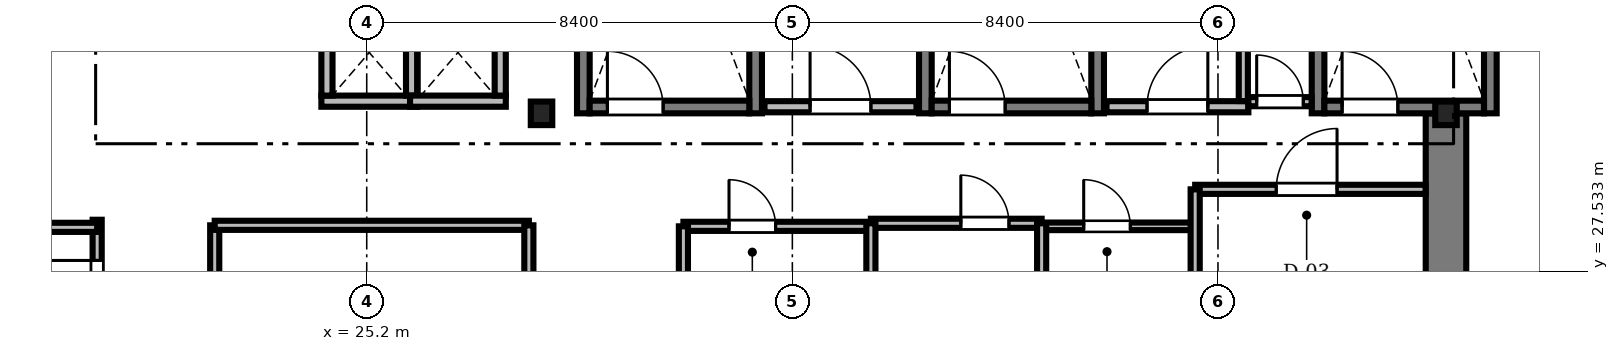
"""IFC4 building model, lengths in metres.
Left out: names, types, materials, properties, quantities, classifications, styles, units other than length and angle.
Written with IfcOpenShell. Run it as: python <this file> out.ifc"""

import sys

from ifc_helpers import new_model, si_unit, direction, frame, frame_2d, origin, origin_2d, place, context, subcontext, project, spatial, rectangle, i_section, extrude, source, transform, mapped, element, fill, save


model = new_model("IFC4")
c1 = context("Model", 3, precision=1e-05, world=origin(), true_north=direction((0.0, 1.0)))
c2 = subcontext(c1, "Body", "Model", "MODEL_VIEW")
j1 = project(units=[si_unit("LENGTHUNIT", "METRE"), si_unit("PLANEANGLEUNIT", "RADIAN")], contexts=[c1])
p1 = place(None, origin())
s1 = spatial("IfcSite", under=j1, at=p1, CompositionType="ELEMENT")
p2 = place(p1, origin())
s2 = spatial("IfcBuilding", under=s1, at=p2, CompositionType="ELEMENT")
p3 = place(p2, frame((0.0, 0.0, 148.3)))
s3 = spatial("IfcBuildingStorey", under=s2, at=p3, CompositionType="ELEMENT", Elevation=148.3)
m1 = source(origin(), c2, "Body", "SweptSolid", [
    extrude(rectangle(XDim=13.15, YDim=0.8, at=frame_2d((6.575, 0.0))), origin(), (0.0, 0.0, 1.0), 3.46),
])
p4 = place(p3, frame((46.5, 17.5, 0.0), z_axis=(0.0, 0.0, 1.0), x_axis=(0.0, 1.0, 0.0)))
e1 = element("IfcWall", 1, at=p4, inside=s3, PredefinedType="SHEAR", context=c2, shape_type="MappedRepresentation", body=[
    mapped(m1, transform((0.0, 0.0, 0.0), scale=1.0)),
])
m2 = source(origin(), c2, "Body", "SweptSolid", [
    extrude(i_section(OverallWidth=0.424, OverallDepth=0.465, WebThickness=0.035, FlangeThickness=0.056, FilletRadius=0.015, at=origin_2d()), origin(), (0.0, 0.0, 1.0), 3.46),
])
for number, where, z_axis, x_axis in (
    (2, (28.65, 30.65, 0.0), (0.0, 0.0, 1.0), (1.0, 0.0, 0.0)),
    (3, (46.5, 30.65, 0.0), (0.0, 0.0, 1.0), (1.0, 0.0, 0.0)),
):
    element("IfcColumn", number, at=place(p3, frame(where, z_axis=z_axis, x_axis=x_axis)), inside=s3, PredefinedType="COLUMN", context=c2, shape_type="MappedRepresentation", body=[
        mapped(m2, transform((0.0, 0.0, 0.0), scale=1.0)),
    ])
m3 = source(origin(), c2, "Body", "SweptSolid", [
    extrude(rectangle(XDim=9.25, YDim=0.25, at=frame_2d((4.625, 0.0))), origin(), (0.0, 0.0, 1.0), 3.5),
])
for number, where, z_axis, x_axis in (
    (4, (29.475, 30.65, 0.0), (0.0, 0.0, 1.0), (0.0, 1.0, 0.0)),
    (5, (32.875, 30.65, 0.0), (0.0, 0.0, 1.0), (0.0, 1.0, 0.0)),
):
    element("IfcWall", number, at=place(p3, frame(where, z_axis=z_axis, x_axis=x_axis)), inside=s3, PredefinedType="SOLIDWALL", context=c2, shape_type="MappedRepresentation", body=[
        mapped(m3, transform((0.0, 0.0, 0.0), scale=1.0)),
    ])
m4 = source(origin(), c2, "Body", "SweptSolid", [
    extrude(rectangle(XDim=3.15, YDim=0.25, at=frame_2d((1.575, 0.0))), origin(), (0.0, 0.0, 1.0), 3.5),
])
p5 = place(p3, frame((29.6, 30.775, 0.0), z_axis=(0.0, 0.0, 1.0), x_axis=(1.0, 0.0, 0.0)))
e6 = element("IfcWall", 6, at=p5, inside=s3, PredefinedType="SOLIDWALL", context=c2, shape_type="MappedRepresentation", body=[
    mapped(m4, transform((0.0, 0.0, 0.0), scale=1.0)),
])
m5 = source(origin(), c2, "Body", "SweptSolid", [
    extrude(rectangle(XDim=1.1, YDim=2.2, at=frame_2d((0.55, 1.1))), frame((0.0, 0.135, 0.0), z_axis=(0.0, -1.0, 0.0), x_axis=(1.0, 0.0, 0.0)), (0.0, 0.0, 1.0), 0.27),
])
p6 = place(p5, frame((0.35, 0.0, 0.0)))
e7 = element("IfcOpeningElement", 7, at=p6, cuts=e6, PredefinedType="OPENING", context=c2, shape_type="MappedRepresentation", body=[
    mapped(m5, transform((0.0, 0.0, 0.0), scale=1.0)),
])
for number, where, z_axis, x_axis in (
    (8, (36.225, 30.65, 0.0), (0.0, 0.0, 1.0), (0.0, 1.0, 0.0)),
    (9, (39.625, 30.65, 0.0), (0.0, 0.0, 1.0), (0.0, 1.0, 0.0)),
):
    element("IfcWall", number, at=place(p3, frame(where, z_axis=z_axis, x_axis=x_axis)), inside=s3, PredefinedType="SOLIDWALL", context=c2, shape_type="MappedRepresentation", body=[
        mapped(m3, transform((0.0, 0.0, 0.0), scale=1.0)),
    ])
p7 = place(p3, frame((36.35, 30.775, 0.0), z_axis=(0.0, 0.0, 1.0), x_axis=(1.0, 0.0, 0.0)))
e10 = element("IfcWall", 10, at=p7, inside=s3, PredefinedType="SOLIDWALL", context=c2, shape_type="MappedRepresentation", body=[
    mapped(m4, transform((0.0, 0.0, 0.0), scale=1.0)),
])
p8 = place(p7, frame((0.35, 0.0, 0.0)))
e11 = element("IfcOpeningElement", 11, at=p8, cuts=e10, PredefinedType="OPENING", context=c2, shape_type="MappedRepresentation", body=[
    mapped(m5, transform((0.0, 0.0, 0.0), scale=1.0)),
])
for number, where, z_axis, x_axis in (
    (12, (43.975, 30.65, 0.0), (0.0, 0.0, 1.0), (0.0, 1.0, 0.0)),
    (13, (47.375, 30.65, 0.0), (0.0, 0.0, 1.0), (0.0, 1.0, 0.0)),
):
    element("IfcWall", number, at=place(p3, frame(where, z_axis=z_axis, x_axis=x_axis)), inside=s3, PredefinedType="SOLIDWALL", context=c2, shape_type="MappedRepresentation", body=[
        mapped(m3, transform((0.0, 0.0, 0.0), scale=1.0)),
    ])
p9 = place(p3, frame((44.1, 30.775, 0.0), z_axis=(0.0, 0.0, 1.0), x_axis=(1.0, 0.0, 0.0)))
e14 = element("IfcWall", 14, at=p9, inside=s3, PredefinedType="SOLIDWALL", context=c2, shape_type="MappedRepresentation", body=[
    mapped(m4, transform((0.0, 0.0, 0.0), scale=1.0)),
])
p10 = place(p9, frame((0.35, 0.0, 0.0)))
e15 = element("IfcOpeningElement", 15, at=p10, cuts=e14, PredefinedType="OPENING", context=c2, shape_type="MappedRepresentation", body=[
    mapped(m5, transform((0.0, 0.0, 0.0), scale=1.0)),
])
m6 = source(origin(), c2, "Body", "SweptSolid", [
    extrude(rectangle(XDim=3.0, YDim=0.22, at=frame_2d((1.5, 0.0))), origin(), (0.0, 0.0, 1.0), 3.46),
])
p11 = place(p3, frame((33.05, 30.78, 0.0), z_axis=(0.0, 0.0, 1.0), x_axis=(1.0, 0.0, 0.0)))
e16 = element("IfcWall", 16, at=p11, inside=s3, PredefinedType="SOLIDWALL", context=c2, shape_type="MappedRepresentation", body=[
    mapped(m6, transform((0.0, 0.0, 0.0), scale=1.0)),
])
m7 = source(origin(), c2, "Body", "SweptSolid", [
    extrude(rectangle(XDim=1.2, YDim=2.2, at=frame_2d((0.6, 1.1))), frame((0.0, 0.12, 0.0), z_axis=(0.0, -1.0, 0.0), x_axis=(1.0, 0.0, 0.0)), (0.0, 0.0, 1.0), 0.24),
])
p12 = place(p11, frame((0.9, 0.0, 0.0)))
e17 = element("IfcOpeningElement", 17, at=p12, cuts=e16, PredefinedType="OPENING", context=c2, shape_type="MappedRepresentation", body=[
    mapped(m7, transform((0.0, 0.0, 0.0), scale=1.0)),
])
m8 = source(origin(), c2, "Body", "SweptSolid", [
    extrude(rectangle(XDim=2.8, YDim=0.22, at=frame_2d((1.4, 0.0))), origin(), (0.0, 0.0, 1.0), 3.46),
])
p13 = place(p3, frame((39.8, 30.78, 0.0), z_axis=(0.0, 0.0, 1.0), x_axis=(1.0, 0.0, 0.0)))
e18 = element("IfcWall", 18, at=p13, inside=s3, PredefinedType="SOLIDWALL", context=c2, shape_type="MappedRepresentation", body=[
    mapped(m8, transform((0.0, 0.0, 0.0), scale=1.0)),
])
p14 = place(p13, frame((0.8, 0.0, 0.0)))
e19 = element("IfcOpeningElement", 19, at=p14, cuts=e18, PredefinedType="OPENING", context=c2, shape_type="MappedRepresentation", body=[
    mapped(m7, transform((0.0, 0.0, 0.0), scale=1.0)),
])
m9 = source(origin(), c2, "Body", "SweptSolid", [
    extrude(rectangle(XDim=1.89, YDim=0.22, at=frame_2d((0.945, 0.0))), origin(), (0.0, 0.0, 1.0), 3.46),
])
p15 = place(p3, frame((24.305, 30.89, 0.0), z_axis=(0.0, 0.0, 1.0), x_axis=(1.0, 0.0, 0.0)))
e20 = element("IfcWall", 20, at=p15, inside=s3, PredefinedType="SOLIDWALL", context=c2, shape_type="MappedRepresentation", body=[
    mapped(m9, transform((0.0, 0.0, 0.0), scale=1.0)),
])
m10 = source(origin(), c2, "Body", "SweptSolid", [
    extrude(rectangle(XDim=1.7, YDim=0.22, at=frame_2d((0.85, 0.0))), origin(), (0.0, 0.0, 1.0), 3.46),
])
for number, where, z_axis, x_axis in (
    (21, (24.415, 31.0, 0.0), (0.0, 0.0, 1.0), (0.0, 1.0, 0.0)),
    (22, (26.085, 31.0, 0.0), (0.0, 0.0, 1.0), (0.0, 1.0, 0.0)),
):
    element("IfcWall", number, at=place(p3, frame(where, z_axis=z_axis, x_axis=x_axis)), inside=s3, PredefinedType="SOLIDWALL", context=c2, shape_type="MappedRepresentation", body=[
        mapped(m10, transform((0.0, 0.0, 0.0), scale=1.0)),
    ])
p16 = place(p3, frame((26.055, 30.89, 0.0), z_axis=(0.0, 0.0, 1.0), x_axis=(1.0, 0.0, 0.0)))
e23 = element("IfcWall", 23, at=p16, inside=s3, PredefinedType="SOLIDWALL", context=c2, shape_type="MappedRepresentation", body=[
    mapped(m9, transform((0.0, 0.0, 0.0), scale=1.0)),
])
p17 = place(p3, frame((27.835, 31.0, 0.0), z_axis=(0.0, 0.0, 1.0), x_axis=(0.0, 1.0, 0.0)))
e24 = element("IfcWall", 24, at=p17, inside=s3, PredefinedType="SOLIDWALL", context=c2, shape_type="MappedRepresentation", body=[
    mapped(m10, transform((0.0, 0.0, 0.0), scale=1.0)),
])
m11 = source(origin(), c2, "Body", "SweptSolid", [
    extrude(rectangle(XDim=14.0, YDim=0.18, at=frame_2d((7.0, 0.0))), origin(), (0.0, 0.0, 1.0), 2.852),
])
p18 = place(p3, frame((19.88, 14.55, 0.0), z_axis=(0.0, 0.0, 1.0), x_axis=(0.0, 1.0, 0.0)))
e25 = element("IfcWall", 25, at=p18, inside=s3, PredefinedType="PARTITIONING", context=c2, shape_type="MappedRepresentation", body=[
    mapped(m11, transform((0.0, 0.0, 0.0), scale=1.0)),
])
m12 = source(origin(), c2, "Body", "SweptSolid", [
    extrude(rectangle(XDim=1.05, YDim=2.2, at=frame_2d((0.525, 1.1))), frame((0.0, 0.1, 0.0), z_axis=(0.0, -1.0, 0.0), x_axis=(1.0, 0.0, 0.0)), (0.0, 0.0, 1.0), 0.2),
])
p19 = place(p18, frame((1.788, 0.0, 0.0)))
e26 = element("IfcOpeningElement", 26, at=p19, cuts=e25, PredefinedType="OPENING", context=c2, shape_type="MappedRepresentation", body=[
    mapped(m12, transform((0.0, 0.0, 0.0), scale=1.0)),
])
m13 = source(origin(), c2, "Body", "SweptSolid", [
    extrude(rectangle(XDim=0.95, YDim=2.15, at=frame_2d((0.475, 1.075))), frame((0.0, 0.1, 0.0), z_axis=(0.0, -1.0, 0.0), x_axis=(1.0, 0.0, 0.0)), (0.0, 0.0, 1.0), 0.2),
])
p20 = place(p18, frame((7.63, 0.0, 0.0)))
e27 = element("IfcOpeningElement", 27, at=p20, cuts=e25, PredefinedType="OPENING", context=c2, shape_type="MappedRepresentation", body=[
    mapped(m13, transform((0.0, 0.0, 0.0), scale=1.0)),
])
p21 = place(p18, frame((12.247, 0.0, 0.0)))
e28 = element("IfcOpeningElement", 28, at=p21, cuts=e25, PredefinedType="OPENING", context=c2, shape_type="MappedRepresentation", body=[
    mapped(m13, transform((0.0, 0.0, 0.0), scale=1.0)),
])
m14 = source(origin(), c2, "Body", "SweptSolid", [
    extrude(rectangle(XDim=4.548, YDim=0.18, at=frame_2d((2.274, 0.0))), origin(), (0.0, 0.0, 1.0), 3.092),
])
p22 = place(p3, frame((41.55, 29.15, 0.0), z_axis=(0.0, 0.0, 1.0), x_axis=(1.0, 0.0, 0.0)))
e29 = element("IfcWall", 29, at=p22, inside=s3, PredefinedType="PARTITIONING", context=c2, shape_type="MappedRepresentation", body=[
    mapped(m14, transform((0.0, 0.0, 0.0), scale=1.0)),
])
m15 = source(origin(), c2, "Body", "SweptSolid", [
    extrude(rectangle(XDim=1.2, YDim=2.2, at=frame_2d((0.6, 1.1))), frame((0.0, 0.1, 0.0), z_axis=(0.0, -1.0, 0.0), x_axis=(1.0, 0.0, 0.0)), (0.0, 0.0, 1.0), 0.2),
])
p23 = place(p22, frame((1.6, 0.0, 0.0)))
e30 = element("IfcOpeningElement", 30, at=p23, cuts=e29, PredefinedType="OPENING", context=c2, shape_type="MappedRepresentation", body=[
    mapped(m15, transform((0.0, 0.0, 0.0), scale=1.0)),
])
m16 = source(origin(), c2, "Body", "SweptSolid", [
    extrude(rectangle(XDim=4.24, YDim=0.18, at=frame_2d((2.12, 0.0))), origin(), (0.0, 0.0, 1.0), 2.852),
])
p24 = place(p3, frame((22.2, 24.2, 0.0), z_axis=(0.0, 0.0, 1.0), x_axis=(0.0, 1.0, 0.0)))
e31 = element("IfcWall", 31, at=p24, inside=s3, PredefinedType="PARTITIONING", context=c2, shape_type="MappedRepresentation", body=[
    mapped(m16, transform((0.0, 0.0, 0.0), scale=1.0)),
])
p25 = place(p24, frame((1.4, 0.0, 0.0)))
e32 = element("IfcOpeningElement", 32, at=p25, cuts=e31, PredefinedType="OPENING", context=c2, shape_type="MappedRepresentation", body=[
    mapped(m12, transform((0.0, 0.0, 0.0), scale=1.0)),
])
m17 = source(origin(), c2, "Body", "SweptSolid", [
    extrude(rectangle(XDim=3.7, YDim=0.18, at=frame_2d((1.85, 0.0))), origin(), (0.0, 0.0, 1.0), 3.092),
])
p26 = place(p3, frame((31.45, 28.42, 0.0), z_axis=(0.0, 0.0, 1.0), x_axis=(1.0, 0.0, 0.0)))
e33 = element("IfcWall", 33, at=p26, inside=s3, PredefinedType="PARTITIONING", context=c2, shape_type="MappedRepresentation", body=[
    mapped(m17, transform((0.0, 0.0, 0.0), scale=1.0)),
])
m18 = source(origin(), c2, "Body", "SweptSolid", [
    extrude(rectangle(XDim=0.92, YDim=2.1, at=frame_2d((0.46, 1.05))), frame((0.0, 0.1, 0.0), z_axis=(0.0, -1.0, 0.0), x_axis=(1.0, 0.0, 0.0)), (0.0, 0.0, 1.0), 0.2),
])
p27 = place(p26, frame((0.9, 0.0, 0.0)))
e34 = element("IfcOpeningElement", 34, at=p27, cuts=e33, PredefinedType="OPENING", context=c2, shape_type="MappedRepresentation", body=[
    mapped(m18, transform((0.0, 0.0, 0.0), scale=1.0)),
])
m19 = source(origin(), c2, "Body", "SweptSolid", [
    extrude(rectangle(XDim=3.37, YDim=0.18, at=frame_2d((1.685, 0.0))), origin(), (0.0, 0.0, 1.0), 3.46),
])
p28 = place(p3, frame((35.15, 28.48, 0.0), z_axis=(0.0, 0.0, 1.0), x_axis=(1.0, 0.0, 0.0)))
e35 = element("IfcWall", 35, at=p28, inside=s3, PredefinedType="PARTITIONING", context=c2, shape_type="MappedRepresentation", body=[
    mapped(m19, transform((0.0, 0.0, 0.0), scale=1.0)),
])
p29 = place(p28, frame((1.775, 0.0, 0.0)))
e36 = element("IfcOpeningElement", 36, at=p29, cuts=e35, PredefinedType="OPENING", context=c2, shape_type="MappedRepresentation", body=[
    mapped(m13, transform((0.0, 0.0, 0.0), scale=1.0)),
])
m20 = source(origin(), c2, "Body", "SweptSolid", [
    extrude(rectangle(XDim=3.0, YDim=0.15, at=frame_2d((1.5, 0.0))), origin(), (0.0, 0.0, 1.0), 3.46),
])
p30 = place(p3, frame((38.52, 28.42, 0.0), z_axis=(0.0, 0.0, 1.0), x_axis=(1.0, 0.0, 0.0)))
e37 = element("IfcWall", 37, at=p30, inside=s3, PredefinedType="PARTITIONING", context=c2, shape_type="MappedRepresentation", body=[
    mapped(m20, transform((0.0, 0.0, 0.0), scale=1.0)),
])
m21 = source(origin(), c2, "Body", "SweptSolid", [
    extrude(rectangle(XDim=0.92, YDim=2.1, at=frame_2d((0.46, 1.05))), frame((0.0, 0.085, 0.0), z_axis=(0.0, -1.0, 0.0), x_axis=(1.0, 0.0, 0.0)), (0.0, 0.0, 1.0), 0.17),
])
p31 = place(p30, frame((0.83, 0.0, 0.0)))
e38 = element("IfcOpeningElement", 38, at=p31, cuts=e37, PredefinedType="OPENING", context=c2, shape_type="MappedRepresentation", body=[
    mapped(m21, transform((0.0, 0.0, 0.0), scale=1.0)),
])
m22 = source(origin(), c2, "Body", "SweptSolid", [
    extrude(rectangle(XDim=1.248, YDim=0.18, at=frame_2d((0.624, 0.0))), origin(), (0.0, 0.0, 1.0), 3.46),
])
p32 = place(p3, frame((42.6, 30.88, 0.0), z_axis=(0.0, 0.0, 1.0), x_axis=(1.0, 0.0, 0.0)))
e39 = element("IfcWall", 39, at=p32, inside=s3, PredefinedType="PARTITIONING", context=c2, shape_type="MappedRepresentation", body=[
    mapped(m22, transform((0.0, 0.0, 0.0), scale=1.0)),
])
p33 = place(p32, frame((0.164, 0.0, 0.0)))
e40 = element("IfcOpeningElement", 40, at=p33, cuts=e39, PredefinedType="OPENING", context=c2, shape_type="MappedRepresentation", body=[
    mapped(m18, transform((0.0, 0.0, 0.0), scale=1.0)),
])
m23 = source(origin(), c2, "Body", "SweptSolid", [
    extrude(rectangle(XDim=13.15, YDim=0.18, at=frame_2d((6.575, 0.0))), origin(), (0.0, 0.0, 1.0), 2.702),
])
p34 = place(p3, frame((6.73, 28.4, 0.0), z_axis=(0.0, 0.0, 1.0), x_axis=(1.0, 0.0, 0.0)))
e41 = element("IfcWall", 41, at=p34, inside=s3, PredefinedType="PARTITIONING", context=c2, shape_type="MappedRepresentation", body=[
    mapped(m23, transform((0.0, 0.0, 0.0), scale=1.0)),
])
m24 = source(origin(), c2, "Body", "SweptSolid", [
    extrude(rectangle(XDim=6.2, YDim=0.18, at=frame_2d((3.1, 0.0))), origin(), (0.0, 0.0, 1.0), 3.46),
])
p35 = place(p3, frame((22.2, 28.44, 0.0), z_axis=(0.0, 0.0, 1.0), x_axis=(1.0, 0.0, 0.0)))
e42 = element("IfcWall", 42, at=p35, inside=s3, PredefinedType="PARTITIONING", context=c2, shape_type="MappedRepresentation", body=[
    mapped(m24, transform((0.0, 0.0, 0.0), scale=1.0)),
])
p36 = place(p3, frame((28.4, 24.2, 0.0), z_axis=(0.0, 0.0, 1.0), x_axis=(0.0, 1.0, 0.0)))
e43 = element("IfcWall", 43, at=p36, inside=s3, PredefinedType="PARTITIONING", context=c2, shape_type="MappedRepresentation", body=[
    mapped(m16, transform((0.0, 0.0, 0.0), scale=1.0)),
])
m25 = source(origin(), c2, "Body", "SweptSolid", [
    extrude(rectangle(XDim=2.35, YDim=0.18, at=frame_2d((1.175, 0.0))), origin(), (0.0, 0.0, 1.0), 2.852),
])
p37 = place(p3, frame((41.55, 26.8, 0.0), z_axis=(0.0, 0.0, 1.0), x_axis=(0.0, 1.0, 0.0)))
e44 = element("IfcWall", 44, at=p37, inside=s3, PredefinedType="PARTITIONING", context=c2, shape_type="MappedRepresentation", body=[
    mapped(m25, transform((0.0, 0.0, 0.0), scale=1.0)),
])
m26 = source(origin(), c2, "Body", "SweptSolid", [
    extrude(rectangle(XDim=1.858, YDim=0.18, at=frame_2d((0.929, 0.0))), origin(), (0.0, 0.0, 1.0), 3.46),
])
p38 = place(p3, frame((42.5, 30.892, 0.0), z_axis=(0.0, 0.0, 1.0), x_axis=(0.0, 1.0, 0.0)))
e45 = element("IfcWall", 45, at=p38, inside=s3, PredefinedType="PARTITIONING", context=c2, shape_type="MappedRepresentation", body=[
    mapped(m26, transform((0.0, 0.0, 0.0), scale=1.0)),
])
m27 = source(origin(), c2, "Body", "SweptSolid", [
    extrude(rectangle(XDim=1.66, YDim=0.18, at=frame_2d((0.83, 0.0))), origin(), (0.0, 0.0, 1.0), 3.002),
])
for number, where, z_axis, x_axis in (
    (46, (35.15, 26.82, 0.0), (0.0, 0.0, 1.0), (0.0, 1.0, 0.0)),
    (47, (38.52, 26.82, 0.0), (0.0, 0.0, 1.0), (0.0, 1.0, 0.0)),
):
    element("IfcWall", number, at=place(p3, frame(where, z_axis=z_axis, x_axis=x_axis)), inside=s3, PredefinedType="PARTITIONING", context=c2, shape_type="MappedRepresentation", body=[
        mapped(m27, transform((0.0, 0.0, 0.0), scale=1.0)),
    ])
m28 = source(origin(), c2, "Body", "SweptSolid", [
    extrude(rectangle(XDim=1.6, YDim=0.18, at=frame_2d((0.8, 0.0))), origin(), (0.0, 0.0, 1.0), 3.002),
])
p39 = place(p3, frame((31.45, 26.82, 0.0), z_axis=(0.0, 0.0, 1.0), x_axis=(0.0, 1.0, 0.0)))
e48 = element("IfcWall", 48, at=p39, inside=s3, PredefinedType="PARTITIONING", context=c2, shape_type="MappedRepresentation", body=[
    mapped(m28, transform((0.0, 0.0, 0.0), scale=1.0)),
])
m29 = source(origin(), c2, "Body", "SweptSolid", [
    extrude(rectangle(XDim=1.1, YDim=2.2, at=frame_2d((0.55, 1.1))), frame((0.0, 0.025, 0.0), z_axis=(0.0, -1.0, 0.0), x_axis=(1.0, 0.0, 0.0)), (0.0, 0.0, 1.0), 0.05),
])
p40 = place(p6, origin())
e49 = element("IfcDoor", 49, at=p40, inside=s3, OperationType="SINGLE_SWING_LEFT", PredefinedType="DOOR", context=c2, shape_type="MappedRepresentation", body=[
    mapped(m29, transform((0.0, 0.0, 0.0), scale=1.0)),
])
fill(e7, e49)
p41 = place(p8, origin())
e50 = element("IfcDoor", 50, at=p41, inside=s3, OperationType="SINGLE_SWING_LEFT", PredefinedType="DOOR", context=c2, shape_type="MappedRepresentation", body=[
    mapped(m29, transform((0.0, 0.0, 0.0), scale=1.0)),
])
fill(e11, e50)
p42 = place(p10, origin())
e51 = element("IfcDoor", 51, at=p42, inside=s3, OperationType="SINGLE_SWING_LEFT", PredefinedType="DOOR", context=c2, shape_type="MappedRepresentation", body=[
    mapped(m29, transform((0.0, 0.0, 0.0), scale=1.0)),
])
fill(e15, e51)
m30 = source(origin(), c2, "Body", "SweptSolid", [
    extrude(rectangle(XDim=1.2, YDim=2.2, at=frame_2d((0.6, 1.1))), frame((0.0, 0.025, 0.0), z_axis=(0.0, -1.0, 0.0), x_axis=(1.0, 0.0, 0.0)), (0.0, 0.0, 1.0), 0.05),
])
p43 = place(p12, origin())
e52 = element("IfcDoor", 52, at=p43, inside=s3, OperationType="SINGLE_SWING_LEFT", PredefinedType="DOOR", context=c2, shape_type="MappedRepresentation", body=[
    mapped(m30, transform((0.0, 0.0, 0.0), scale=1.0)),
])
fill(e17, e52)
p44 = place(p14, origin())
e53 = element("IfcDoor", 53, at=p44, inside=s3, OperationType="SINGLE_SWING_RIGHT", PredefinedType="DOOR", context=c2, shape_type="MappedRepresentation", body=[
    mapped(m30, transform((0.0, 0.0, 0.0), scale=1.0)),
])
fill(e19, e53)
m31 = source(origin(), c2, "Body", "SweptSolid", [
    extrude(rectangle(XDim=0.95, YDim=2.15, at=frame_2d((0.475, 1.075))), frame((0.0, 0.025, 0.0), z_axis=(0.0, -1.0, 0.0), x_axis=(1.0, 0.0, 0.0)), (0.0, 0.0, 1.0), 0.05),
])
p45 = place(p21, origin())
e54 = element("IfcDoor", 54, at=p45, inside=s3, OperationType="SINGLE_SWING_RIGHT", PredefinedType="DOOR", context=c2, shape_type="MappedRepresentation", body=[
    mapped(m31, transform((0.0, 0.0, 0.0), scale=1.0)),
])
fill(e28, e54)
p46 = place(p23, origin())
e55 = element("IfcDoor", 55, at=p46, inside=s3, OperationType="SINGLE_SWING_RIGHT", PredefinedType="DOOR", context=c2, shape_type="MappedRepresentation", body=[
    mapped(m30, transform((0.0, 0.0, 0.0), scale=1.0)),
])
fill(e30, e55)
m32 = source(origin(), c2, "Body", "SweptSolid", [
    extrude(rectangle(XDim=0.92, YDim=2.1, at=frame_2d((0.46, 1.05))), frame((0.0, 0.025, 0.0), z_axis=(0.0, -1.0, 0.0), x_axis=(1.0, 0.0, 0.0)), (0.0, 0.0, 1.0), 0.05),
])
p47 = place(p27, origin())
e56 = element("IfcDoor", 56, at=p47, inside=s3, OperationType="SINGLE_SWING_LEFT", PredefinedType="DOOR", context=c2, shape_type="MappedRepresentation", body=[
    mapped(m32, transform((0.0, 0.0, 0.0), scale=1.0)),
])
fill(e34, e56)
p48 = place(p29, origin())
e57 = element("IfcDoor", 57, at=p48, inside=s3, OperationType="SINGLE_SWING_LEFT", PredefinedType="DOOR", context=c2, shape_type="MappedRepresentation", body=[
    mapped(m31, transform((0.0, 0.0, 0.0), scale=1.0)),
])
fill(e36, e57)
p49 = place(p31, origin())
e58 = element("IfcDoor", 58, at=p49, inside=s3, OperationType="SINGLE_SWING_LEFT", PredefinedType="DOOR", context=c2, shape_type="MappedRepresentation", body=[
    mapped(m32, transform((0.0, 0.0, 0.0), scale=1.0)),
])
fill(e38, e58)
p50 = place(p33, origin())
e59 = element("IfcDoor", 59, at=p50, inside=s3, OperationType="SINGLE_SWING_LEFT", PredefinedType="DOOR", context=c2, shape_type="MappedRepresentation", body=[
    mapped(m32, transform((0.0, 0.0, 0.0), scale=1.0)),
])
fill(e40, e59)
save(model, sys.argv[1])
